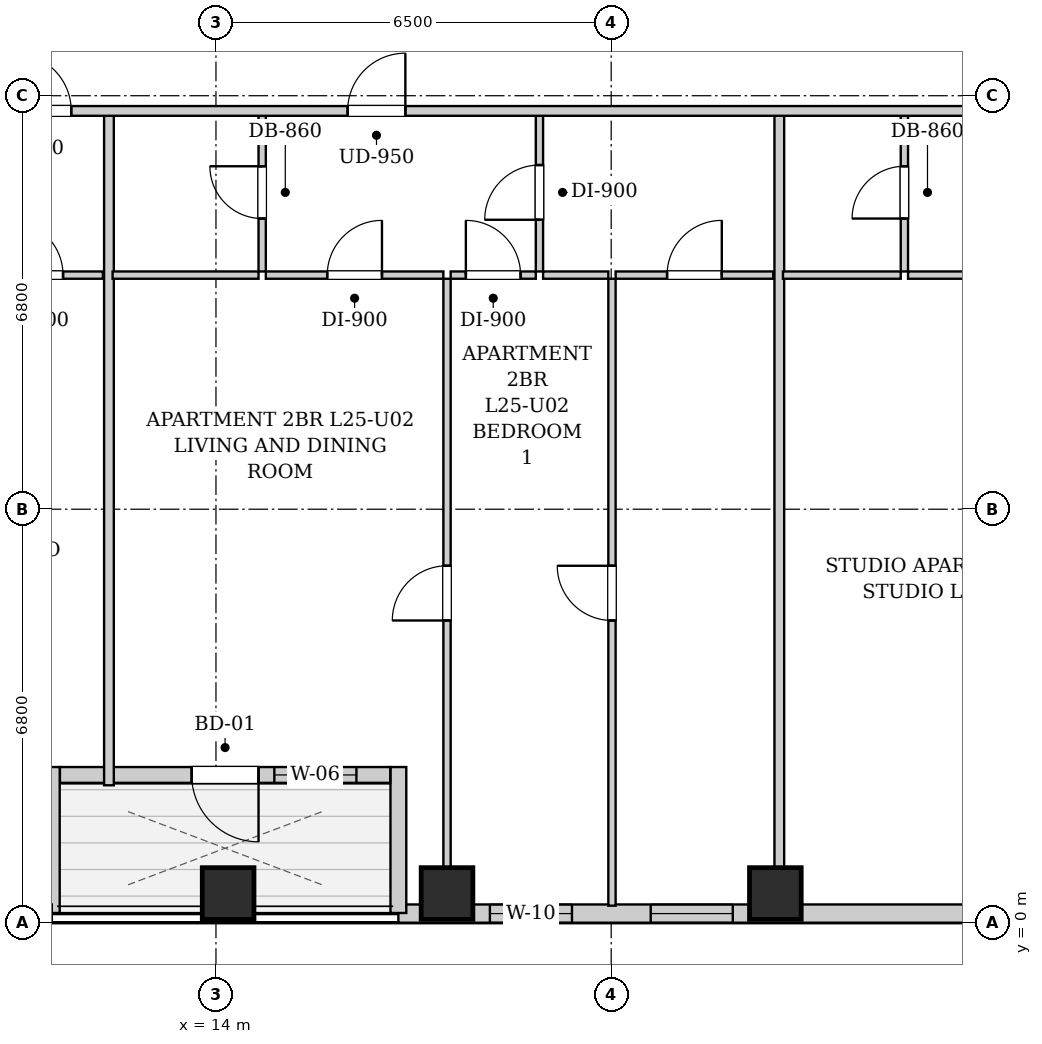
"""IFC4 building model, lengths in metres.
Left out: names, types, materials, properties, quantities, classifications, styles, units other than length and angle.
Written with IfcOpenShell. Run it as: python <this file> out.ifc"""

import sys

from ifc_helpers import new_model, si_unit, direction, frame, frame_2d, origin, origin_2d, place, context, subcontext, project, spatial, rectangle, extrude, element, fill, save


model = new_model("IFC4")
c1 = context("Model", 3, precision=1e-05, world=origin(), true_north=direction((0.0, 1.0)))
c2 = subcontext(c1, "Body", "Model", "MODEL_VIEW")
j1 = project(units=[si_unit("LENGTHUNIT", "METRE"), si_unit("PLANEANGLEUNIT", "RADIAN")], contexts=[c1])
p1 = place(None, origin())
s1 = spatial("IfcSite", under=j1, at=p1, CompositionType="ELEMENT")
p2 = place(p1, origin())
s2 = spatial("IfcBuilding", under=s1, at=p2, CompositionType="ELEMENT")
p3 = place(p2, frame((0.0, 0.0, 91.1)))
s3 = spatial("IfcBuildingStorey", under=s2, at=p3, CompositionType="ELEMENT", Elevation=91.1)
for number, where, z_axis, x_axis in (
    (1, (14.2, 0.48, 0.0), (0.0, 0.0, 1.0), (1.0, 0.0, 0.0)),
    (2, (17.8, 0.48, 0.0), (0.0, 0.0, 1.0), (1.0, 0.0, 0.0)),
    (3, (23.2, 0.48, 0.0), (0.0, 0.0, 1.0), (1.0, 0.0, 0.0)),
):
    element("IfcColumn", number, at=place(p3, frame(where, z_axis=z_axis, x_axis=x_axis)), inside=s3, PredefinedType="COLUMN", context=c2, shape_type="SweptSolid", body=[
        extrude(rectangle(XDim=0.85, YDim=0.85, at=origin_2d()), origin(), (0.0, 0.0, 1.0), 3.2),
    ])
p4 = place(p3, frame((40.9, 0.15, 0.0), z_axis=(0.0, 0.0, 1.0), x_axis=(-1.0, 0.0, 0.0)))
e4 = element("IfcWall", 4, at=p4, inside=s3, PredefinedType="SOLIDWALL", context=c2, shape_type="SweptSolid", body=[
    extrude(rectangle(XDim=23.9, YDim=0.3, at=frame_2d((11.95, 0.0))), origin(), (0.0, 0.0, 1.0), 2.94),
])
p5 = place(p4, frame((21.045, 0.0, 0.55)))
e5 = element("IfcOpeningElement", 5, at=p5, cuts=e4, PredefinedType="OPENING", context=c2, shape_type="SweptSolid", body=[
    extrude(rectangle(XDim=1.35, YDim=1.2, at=frame_2d((0.675, 0.6))), frame((0.0, 0.16, 0.0), z_axis=(0.0, -1.0, 0.0), x_axis=(1.0, 0.0, 0.0)), (0.0, 0.0, 1.0), 0.32),
])
p6 = place(p4, frame((18.4, 0.0, 0.55)))
e6 = element("IfcOpeningElement", 6, at=p6, cuts=e4, PredefinedType="OPENING", context=c2, shape_type="SweptSolid", body=[
    extrude(rectangle(XDim=1.35, YDim=1.2, at=frame_2d((0.675, 0.6))), frame((0.0, 0.16, 0.0), z_axis=(0.0, -1.0, 0.0), x_axis=(1.0, 0.0, 0.0)), (0.0, 0.0, 1.0), 0.32),
])
p7 = place(p4, frame((12.05, 0.0, 0.55)))
e7 = element("IfcOpeningElement", 7, at=p7, cuts=e4, PredefinedType="OPENING", context=c2, shape_type="SweptSolid", body=[
    extrude(rectangle(XDim=1.35, YDim=1.2, at=frame_2d((0.675, 0.6))), frame((0.0, 0.16, 0.0), z_axis=(0.0, -1.0, 0.0), x_axis=(1.0, 0.0, 0.0)), (0.0, 0.0, 1.0), 0.32),
])
p8 = place(p4, frame((8.72, 0.0, 0.55)))
e8 = element("IfcOpeningElement", 8, at=p8, cuts=e4, PredefinedType="OPENING", context=c2, shape_type="SweptSolid", body=[
    extrude(rectangle(XDim=1.35, YDim=1.2, at=frame_2d((0.675, 0.6))), frame((0.0, 0.16, 0.0), z_axis=(0.0, -1.0, 0.0), x_axis=(1.0, 0.0, 0.0)), (0.0, 0.0, 1.0), 0.32),
])
p9 = place(p4, frame((5.563, 0.0, 0.55)))
e9 = element("IfcOpeningElement", 9, at=p9, cuts=e4, PredefinedType="OPENING", context=c2, shape_type="SweptSolid", body=[
    extrude(rectangle(XDim=1.35, YDim=1.2, at=frame_2d((0.675, 0.6))), frame((0.0, 0.16, 0.0), z_axis=(0.0, -1.0, 0.0), x_axis=(1.0, 0.0, 0.0)), (0.0, 0.0, 1.0), 0.32),
])
p10 = place(p3, frame((17.0, 0.16, 0.0), z_axis=(0.0, 0.0, 1.0), x_axis=(0.0, 1.0, 0.0)))
e10 = element("IfcWall", 10, at=p10, inside=s3, PredefinedType="SOLIDWALL", context=c2, shape_type="SweptSolid", body=[
    extrude(rectangle(XDim=2.4, YDim=0.26, at=frame_2d((1.2, 0.0))), origin(), (0.0, 0.0, 1.0), 2.94),
])
p11 = place(p3, frame((16.866, 2.43, 0.0), z_axis=(0.0, 0.0, 1.0), x_axis=(-1.0, 0.0, 0.0)))
e11 = element("IfcWall", 11, at=p11, inside=s3, PredefinedType="SOLIDWALL", context=c2, shape_type="SweptSolid", body=[
    extrude(rectangle(XDim=5.432, YDim=0.26, at=frame_2d((2.716, 0.0))), origin(), (0.0, 0.0, 1.0), 2.94),
])
p12 = place(p11, frame((2.166, 0.0, 0.0)))
e12 = element("IfcOpeningElement", 12, at=p12, cuts=e11, PredefinedType="OPENING", context=c2, shape_type="SweptSolid", body=[
    extrude(rectangle(XDim=1.1, YDim=2.0, at=frame_2d((0.55, 1.0))), frame((0.0, 0.14, 0.0), z_axis=(0.0, -1.0, 0.0), x_axis=(1.0, 0.0, 0.0)), (0.0, 0.0, 1.0), 0.28),
])
p13 = place(p11, frame((0.556, 0.0, 0.85)))
e13 = element("IfcOpeningElement", 13, at=p13, cuts=e11, PredefinedType="OPENING", context=c2, shape_type="SweptSolid", body=[
    extrude(rectangle(XDim=1.35, YDim=1.65, at=frame_2d((0.675, 0.825))), frame((0.0, 0.14, 0.0), z_axis=(0.0, -1.0, 0.0), x_axis=(1.0, 0.0, 0.0)), (0.0, 0.0, 1.0), 0.28),
])
p14 = place(p3, frame((11.3, 2.56, 0.0), z_axis=(0.0, 0.0, 1.0), x_axis=(0.0, -1.0, 0.0)))
e14 = element("IfcWall", 14, at=p14, inside=s3, PredefinedType="SOLIDWALL", context=c2, shape_type="SweptSolid", body=[
    extrude(rectangle(XDim=2.4, YDim=0.26, at=frame_2d((1.2, 0.0))), origin(), (0.0, 0.0, 1.0), 2.94),
])
p15 = place(p3, frame((11.3, 0.15, 0.0), z_axis=(0.0, 0.0, 1.0), x_axis=(-1.0, 0.0, 0.0)))
e15 = element("IfcWall", 15, at=p15, inside=s3, PredefinedType="SOLIDWALL", context=c2, shape_type="SweptSolid", body=[
    extrude(rectangle(XDim=1.3, YDim=0.3, at=frame_2d((0.65, 0.0))), origin(), (0.0, 0.0, 1.0), 2.94),
])
p16 = place(p3, frame((9.93, 10.65, 0.0), z_axis=(0.0, 0.0, 1.0), x_axis=(1.0, 0.0, 0.0)))
e16 = element("IfcWall", 16, at=p16, inside=s3, PredefinedType="PARTITIONING", context=c2, shape_type="SweptSolid", body=[
    extrude(rectangle(XDim=2.21, YDim=0.12, at=frame_2d((1.105, 0.0))), origin(), (0.0, 0.0, 1.0), 2.94),
])
p17 = place(p16, frame((0.655, 0.0, 0.0)))
e17 = element("IfcOpeningElement", 17, at=p17, cuts=e16, PredefinedType="OPENING", context=c2, shape_type="SweptSolid", body=[
    extrude(rectangle(XDim=0.9, YDim=2.05, at=frame_2d((0.45, 1.025))), frame((0.0, 0.07, 0.0), z_axis=(0.0, -1.0, 0.0), x_axis=(1.0, 0.0, 0.0)), (0.0, 0.0, 1.0), 0.14),
])
p18 = place(p3, frame((12.24, 2.26, 0.0), z_axis=(0.0, 0.0, 1.0), x_axis=(0.0, 1.0, 0.0)))
e18 = element("IfcWall", 18, at=p18, inside=s3, PredefinedType="PARTITIONING", context=c2, shape_type="SweptSolid", body=[
    extrude(rectangle(XDim=11.05, YDim=0.16, at=frame_2d((5.525, 0.0))), origin(), (0.0, 0.0, 1.0), 2.94),
])
p19 = place(p3, frame((14.76, 10.71, 0.0), z_axis=(0.0, 0.0, 1.0), x_axis=(0.0, 1.0, 0.0)))
e19 = element("IfcWall", 19, at=p19, inside=s3, PredefinedType="PARTITIONING", context=c2, shape_type="SweptSolid", body=[
    extrude(rectangle(XDim=2.6, YDim=0.12, at=frame_2d((1.3, 0.0))), origin(), (0.0, 0.0, 1.0), 2.94),
])
p20 = place(p19, frame((0.87, 0.0, 0.0)))
e20 = element("IfcOpeningElement", 20, at=p20, cuts=e19, PredefinedType="OPENING", context=c2, shape_type="SweptSolid", body=[
    extrude(rectangle(XDim=0.86, YDim=2.05, at=frame_2d((0.43, 1.025))), frame((0.0, 0.07, 0.0), z_axis=(0.0, -1.0, 0.0), x_axis=(1.0, 0.0, 0.0)), (0.0, 0.0, 1.0), 0.14),
])
p21 = place(p3, frame((12.3, 10.65, 0.0), z_axis=(0.0, 0.0, 1.0), x_axis=(1.0, 0.0, 0.0)))
e21 = element("IfcWall", 21, at=p21, inside=s3, PredefinedType="PARTITIONING", context=c2, shape_type="SweptSolid", body=[
    extrude(rectangle(XDim=2.4, YDim=0.12, at=frame_2d((1.2, 0.0))), origin(), (0.0, 0.0, 1.0), 2.94),
])
p22 = place(p3, frame((19.32, 10.71, 0.0), z_axis=(0.0, 0.0, 1.0), x_axis=(0.0, 1.0, 0.0)))
e22 = element("IfcWall", 22, at=p22, inside=s3, PredefinedType="PARTITIONING", context=c2, shape_type="SweptSolid", body=[
    extrude(rectangle(XDim=2.6, YDim=0.12, at=frame_2d((1.3, 0.0))), origin(), (0.0, 0.0, 1.0), 2.94),
])
p23 = place(p22, frame((0.85, 0.0, 0.0)))
e23 = element("IfcOpeningElement", 23, at=p23, cuts=e22, PredefinedType="OPENING", context=c2, shape_type="SweptSolid", body=[
    extrude(rectangle(XDim=0.9, YDim=2.05, at=frame_2d((0.45, 1.025))), frame((0.0, 0.07, 0.0), z_axis=(0.0, -1.0, 0.0), x_axis=(1.0, 0.0, 0.0)), (0.0, 0.0, 1.0), 0.14),
])
p24 = place(p3, frame((14.82, 10.65, 0.0), z_axis=(0.0, 0.0, 1.0), x_axis=(1.0, 0.0, 0.0)))
e24 = element("IfcWall", 24, at=p24, inside=s3, PredefinedType="PARTITIONING", context=c2, shape_type="SweptSolid", body=[
    extrude(rectangle(XDim=2.92, YDim=0.12, at=frame_2d((1.46, 0.0))), origin(), (0.0, 0.0, 1.0), 2.94),
])
p25 = place(p24, frame((1.01, 0.0, 0.0)))
e25 = element("IfcOpeningElement", 25, at=p25, cuts=e24, PredefinedType="OPENING", context=c2, shape_type="SweptSolid", body=[
    extrude(rectangle(XDim=0.9, YDim=2.05, at=frame_2d((0.45, 1.025))), frame((0.0, 0.07, 0.0), z_axis=(0.0, -1.0, 0.0), x_axis=(1.0, 0.0, 0.0)), (0.0, 0.0, 1.0), 0.14),
])
p26 = place(p3, frame((17.86, 10.65, 0.0), z_axis=(0.0, 0.0, 1.0), x_axis=(1.0, 0.0, 0.0)))
e26 = element("IfcWall", 26, at=p26, inside=s3, PredefinedType="PARTITIONING", context=c2, shape_type="SweptSolid", body=[
    extrude(rectangle(XDim=1.4, YDim=0.12, at=frame_2d((0.7, 0.0))), origin(), (0.0, 0.0, 1.0), 2.94),
])
p27 = place(p26, frame((0.25, 0.0, 0.0)))
e27 = element("IfcOpeningElement", 27, at=p27, cuts=e26, PredefinedType="OPENING", context=c2, shape_type="SweptSolid", body=[
    extrude(rectangle(XDim=0.9, YDim=2.05, at=frame_2d((0.45, 1.025))), frame((0.0, 0.07, 0.0), z_axis=(0.0, -1.0, 0.0), x_axis=(1.0, 0.0, 0.0)), (0.0, 0.0, 1.0), 0.14),
])
p28 = place(p3, frame((19.38, 10.65, 0.0), z_axis=(0.0, 0.0, 1.0), x_axis=(1.0, 0.0, 0.0)))
e28 = element("IfcWall", 28, at=p28, inside=s3, PredefinedType="PARTITIONING", context=c2, shape_type="SweptSolid", body=[
    extrude(rectangle(XDim=1.073, YDim=0.12, at=frame_2d((0.537, 0.0))), origin(), (0.0, 0.0, 1.0), 2.94),
])
p29 = place(p3, frame((20.573, 10.65, 0.0), z_axis=(0.0, 0.0, 1.0), x_axis=(1.0, 0.0, 0.0)))
e29 = element("IfcWall", 29, at=p29, inside=s3, PredefinedType="PARTITIONING", context=c2, shape_type="SweptSolid", body=[
    extrude(rectangle(XDim=2.592, YDim=0.12, at=frame_2d((1.296, 0.0))), origin(), (0.0, 0.0, 1.0), 2.94),
])
p30 = place(p29, frame((0.846, 0.0, 0.0)))
e30 = element("IfcOpeningElement", 30, at=p30, cuts=e29, PredefinedType="OPENING", context=c2, shape_type="SweptSolid", body=[
    extrude(rectangle(XDim=0.9, YDim=2.05, at=frame_2d((0.45, 1.025))), frame((0.0, 0.07, 0.0), z_axis=(0.0, -1.0, 0.0), x_axis=(1.0, 0.0, 0.0)), (0.0, 0.0, 1.0), 0.14),
])
p31 = place(p3, frame((17.8, 0.28, 0.0), z_axis=(0.0, 0.0, 1.0), x_axis=(0.0, 1.0, 0.0)))
e31 = element("IfcWall", 31, at=p31, inside=s3, PredefinedType="PARTITIONING", context=c2, shape_type="SweptSolid", body=[
    extrude(rectangle(XDim=10.31, YDim=0.12, at=frame_2d((5.155, 0.0))), origin(), (0.0, 0.0, 1.0), 2.309),
])
p32 = place(p31, frame((4.69, 0.0, 0.0)))
e32 = element("IfcOpeningElement", 32, at=p32, cuts=e31, PredefinedType="OPENING", context=c2, shape_type="SweptSolid", body=[
    extrude(rectangle(XDim=0.9, YDim=2.05, at=frame_2d((0.45, 1.025))), frame((0.0, 0.07, 0.0), z_axis=(0.0, -1.0, 0.0), x_axis=(1.0, 0.0, 0.0)), (0.0, 0.0, 1.0), 0.14),
])
p33 = place(p3, frame((20.513, 0.28, 0.0), z_axis=(0.0, 0.0, 1.0), x_axis=(0.0, 1.0, 0.0)))
e33 = element("IfcWall", 33, at=p33, inside=s3, PredefinedType="PARTITIONING", context=c2, shape_type="SweptSolid", body=[
    extrude(rectangle(XDim=10.31, YDim=0.12, at=frame_2d((5.155, 0.0))), origin(), (0.0, 0.0, 1.0), 2.94),
])
p34 = place(p33, frame((4.69, 0.0, 0.0)))
e34 = element("IfcOpeningElement", 34, at=p34, cuts=e33, PredefinedType="OPENING", context=c2, shape_type="SweptSolid", body=[
    extrude(rectangle(XDim=0.9, YDim=2.05, at=frame_2d((0.45, 1.025))), frame((0.0, 0.07, 0.0), z_axis=(0.0, -1.0, 0.0), x_axis=(1.0, 0.0, 0.0)), (0.0, 0.0, 1.0), 0.14),
])
p35 = place(p3, frame((23.265, 0.28, 0.0), z_axis=(0.0, 0.0, 1.0), x_axis=(0.0, 1.0, 0.0)))
e35 = element("IfcWall", 35, at=p35, inside=s3, PredefinedType="PARTITIONING", context=c2, shape_type="SweptSolid", body=[
    extrude(rectangle(XDim=13.03, YDim=0.16, at=frame_2d((6.515, 0.0))), origin(), (0.0, 0.0, 1.0), 2.94),
])
p36 = place(p3, frame((25.322, 10.71, 0.0), z_axis=(0.0, 0.0, 1.0), x_axis=(0.0, 1.0, 0.0)))
e36 = element("IfcWall", 36, at=p36, inside=s3, PredefinedType="PARTITIONING", context=c2, shape_type="SweptSolid", body=[
    extrude(rectangle(XDim=2.6, YDim=0.12, at=frame_2d((1.3, 0.0))), origin(), (0.0, 0.0, 1.0), 2.94),
])
p37 = place(p36, frame((0.87, 0.0, 0.0)))
e37 = element("IfcOpeningElement", 37, at=p37, cuts=e36, PredefinedType="OPENING", context=c2, shape_type="SweptSolid", body=[
    extrude(rectangle(XDim=0.86, YDim=2.05, at=frame_2d((0.43, 1.025))), frame((0.0, 0.07, 0.0), z_axis=(0.0, -1.0, 0.0), x_axis=(1.0, 0.0, 0.0)), (0.0, 0.0, 1.0), 0.14),
])
p38 = place(p3, frame((23.325, 10.65, 0.0), z_axis=(0.0, 0.0, 1.0), x_axis=(1.0, 0.0, 0.0)))
e38 = element("IfcWall", 38, at=p38, inside=s3, PredefinedType="PARTITIONING", context=c2, shape_type="SweptSolid", body=[
    extrude(rectangle(XDim=1.937, YDim=0.12, at=frame_2d((0.969, 0.0))), origin(), (0.0, 0.0, 1.0), 2.94),
])
p39 = place(p3, frame((25.382, 10.65, 0.0), z_axis=(0.0, 0.0, 1.0), x_axis=(1.0, 0.0, 0.0)))
e39 = element("IfcWall", 39, at=p39, inside=s3, PredefinedType="PARTITIONING", context=c2, shape_type="SweptSolid", body=[
    extrude(rectangle(XDim=4.398, YDim=0.12, at=frame_2d((2.199, 0.0))), origin(), (0.0, 0.0, 1.0), 2.94),
])
p40 = place(p39, frame((1.749, 0.0, 0.0)))
e40 = element("IfcOpeningElement", 40, at=p40, cuts=e39, PredefinedType="OPENING", context=c2, shape_type="SweptSolid", body=[
    extrude(rectangle(XDim=0.9, YDim=2.05, at=frame_2d((0.45, 1.025))), frame((0.0, 0.07, 0.0), z_axis=(0.0, -1.0, 0.0), x_axis=(1.0, 0.0, 0.0)), (0.0, 0.0, 1.0), 0.14),
])
p41 = place(p3, frame((10.05, 13.35, 0.0), z_axis=(0.0, 0.0, 1.0), x_axis=(1.0, 0.0, 0.0)))
e41 = element("IfcWall", 41, at=p41, inside=s3, PredefinedType="PARTITIONING", context=c2, shape_type="SweptSolid", body=[
    extrude(rectangle(XDim=30.8, YDim=0.16, at=frame_2d((15.4, 0.0))), origin(), (0.0, 0.0, 1.0), 2.94),
])
p42 = place(p41, frame((0.62, 0.0, 0.0)))
e42 = element("IfcOpeningElement", 42, at=p42, cuts=e41, PredefinedType="OPENING", context=c2, shape_type="SweptSolid", body=[
    extrude(rectangle(XDim=0.95, YDim=2.1, at=frame_2d((0.475, 1.05))), frame((0.0, 0.09, 0.0), z_axis=(0.0, -1.0, 0.0), x_axis=(1.0, 0.0, 0.0)), (0.0, 0.0, 1.0), 0.18),
])
p43 = place(p41, frame((6.115, 0.0, 0.0)))
e43 = element("IfcOpeningElement", 43, at=p43, cuts=e41, PredefinedType="OPENING", context=c2, shape_type="SweptSolid", body=[
    extrude(rectangle(XDim=0.95, YDim=2.1, at=frame_2d((0.475, 1.05))), frame((0.0, 0.09, 0.0), z_axis=(0.0, -1.0, 0.0), x_axis=(1.0, 0.0, 0.0)), (0.0, 0.0, 1.0), 0.18),
])
p44 = place(p41, frame((17.056, 0.0, 0.0)))
e44 = element("IfcOpeningElement", 44, at=p44, cuts=e41, PredefinedType="OPENING", context=c2, shape_type="SweptSolid", body=[
    extrude(rectangle(XDim=0.95, YDim=2.1, at=frame_2d((0.475, 1.05))), frame((0.0, 0.09, 0.0), z_axis=(0.0, -1.0, 0.0), x_axis=(1.0, 0.0, 0.0)), (0.0, 0.0, 1.0), 0.18),
])
p45 = place(p41, frame((24.025, 0.0, 0.0)))
e45 = element("IfcOpeningElement", 45, at=p45, cuts=e41, PredefinedType="OPENING", context=c2, shape_type="SweptSolid", body=[
    extrude(rectangle(XDim=0.95, YDim=2.1, at=frame_2d((0.475, 1.05))), frame((0.0, 0.09, 0.0), z_axis=(0.0, -1.0, 0.0), x_axis=(1.0, 0.0, 0.0)), (0.0, 0.0, 1.0), 0.18),
])
p46 = place(p17, origin())
e46 = element("IfcDoor", 46, at=p46, inside=s3, OperationType="SINGLE_SWING_LEFT", PredefinedType="DOOR", context=c2, shape_type="SweptSolid", body=[
    extrude(rectangle(XDim=0.9, YDim=2.05, at=frame_2d((0.45, 1.025))), frame((0.0, 0.025, 0.0), z_axis=(0.0, -1.0, 0.0), x_axis=(1.0, 0.0, 0.0)), (0.0, 0.0, 1.0), 0.05),
])
fill(e17, e46)
p47 = place(p20, origin())
e47 = element("IfcDoor", 47, at=p47, inside=s3, OperationType="SINGLE_SWING_RIGHT", PredefinedType="DOOR", context=c2, shape_type="SweptSolid", body=[
    extrude(rectangle(XDim=0.86, YDim=2.05, at=frame_2d((0.43, 1.025))), frame((0.0, 0.025, 0.0), z_axis=(0.0, -1.0, 0.0), x_axis=(1.0, 0.0, 0.0)), (0.0, 0.0, 1.0), 0.05),
])
fill(e20, e47)
p48 = place(p23, origin())
e48 = element("IfcDoor", 48, at=p48, inside=s3, OperationType="SINGLE_SWING_LEFT", PredefinedType="DOOR", context=c2, shape_type="SweptSolid", body=[
    extrude(rectangle(XDim=0.9, YDim=2.05, at=frame_2d((0.45, 1.025))), frame((0.0, 0.025, 0.0), z_axis=(0.0, -1.0, 0.0), x_axis=(1.0, 0.0, 0.0)), (0.0, 0.0, 1.0), 0.05),
])
fill(e23, e48)
p49 = place(p25, origin())
e49 = element("IfcDoor", 49, at=p49, inside=s3, OperationType="SINGLE_SWING_RIGHT", PredefinedType="DOOR", context=c2, shape_type="SweptSolid", body=[
    extrude(rectangle(XDim=0.9, YDim=2.05, at=frame_2d((0.45, 1.025))), frame((0.0, 0.025, 0.0), z_axis=(0.0, -1.0, 0.0), x_axis=(1.0, 0.0, 0.0)), (0.0, 0.0, 1.0), 0.05),
])
fill(e25, e49)
p50 = place(p27, origin())
e50 = element("IfcDoor", 50, at=p50, inside=s3, OperationType="SINGLE_SWING_LEFT", PredefinedType="DOOR", context=c2, shape_type="SweptSolid", body=[
    extrude(rectangle(XDim=0.9, YDim=2.05, at=frame_2d((0.45, 1.025))), frame((0.0, 0.025, 0.0), z_axis=(0.0, -1.0, 0.0), x_axis=(1.0, 0.0, 0.0)), (0.0, 0.0, 1.0), 0.05),
])
fill(e27, e50)
p51 = place(p30, origin())
e51 = element("IfcDoor", 51, at=p51, inside=s3, OperationType="SINGLE_SWING_RIGHT", PredefinedType="DOOR", context=c2, shape_type="SweptSolid", body=[
    extrude(rectangle(XDim=0.9, YDim=2.05, at=frame_2d((0.45, 1.025))), frame((0.0, 0.025, 0.0), z_axis=(0.0, -1.0, 0.0), x_axis=(1.0, 0.0, 0.0)), (0.0, 0.0, 1.0), 0.05),
])
fill(e30, e51)
p52 = place(p32, origin())
e52 = element("IfcDoor", 52, at=p52, inside=s3, OperationType="SINGLE_SWING_LEFT", PredefinedType="DOOR", context=c2, shape_type="SweptSolid", body=[
    extrude(rectangle(XDim=0.9, YDim=2.05, at=frame_2d((0.45, 1.025))), frame((0.0, 0.025, 0.0), z_axis=(0.0, -1.0, 0.0), x_axis=(1.0, 0.0, 0.0)), (0.0, 0.0, 1.0), 0.05),
])
fill(e32, e52)
p53 = place(p34, origin())
e53 = element("IfcDoor", 53, at=p53, inside=s3, OperationType="SINGLE_SWING_RIGHT", PredefinedType="DOOR", context=c2, shape_type="SweptSolid", body=[
    extrude(rectangle(XDim=0.9, YDim=2.05, at=frame_2d((0.45, 1.025))), frame((0.0, 0.025, 0.0), z_axis=(0.0, -1.0, 0.0), x_axis=(1.0, 0.0, 0.0)), (0.0, 0.0, 1.0), 0.05),
])
fill(e34, e53)
p54 = place(p37, origin())
e54 = element("IfcDoor", 54, at=p54, inside=s3, OperationType="SINGLE_SWING_LEFT", PredefinedType="DOOR", context=c2, shape_type="SweptSolid", body=[
    extrude(rectangle(XDim=0.86, YDim=2.05, at=frame_2d((0.43, 1.025))), frame((0.0, 0.025, 0.0), z_axis=(0.0, -1.0, 0.0), x_axis=(1.0, 0.0, 0.0)), (0.0, 0.0, 1.0), 0.05),
])
fill(e37, e54)
p55 = place(p42, origin())
e55 = element("IfcDoor", 55, at=p55, inside=s3, OperationType="SINGLE_SWING_LEFT", PredefinedType="DOOR", context=c2, shape_type="SweptSolid", body=[
    extrude(rectangle(XDim=0.95, YDim=2.1, at=frame_2d((0.475, 1.05))), frame((0.0, 0.025, 0.0), z_axis=(0.0, -1.0, 0.0), x_axis=(1.0, 0.0, 0.0)), (0.0, 0.0, 1.0), 0.05),
])
fill(e42, e55)
p56 = place(p43, origin())
e56 = element("IfcDoor", 56, at=p56, inside=s3, OperationType="SINGLE_SWING_RIGHT", PredefinedType="DOOR", context=c2, shape_type="SweptSolid", body=[
    extrude(rectangle(XDim=0.95, YDim=2.1, at=frame_2d((0.475, 1.05))), frame((0.0, 0.025, 0.0), z_axis=(0.0, -1.0, 0.0), x_axis=(1.0, 0.0, 0.0)), (0.0, 0.0, 1.0), 0.05),
])
fill(e43, e56)
p57 = place(p12, origin())
e57 = element("IfcDoor", 57, at=p57, inside=s3, OperationType="SINGLE_SWING_LEFT", PredefinedType="DOOR", context=c2, shape_type="SweptSolid", body=[
    extrude(rectangle(XDim=1.1, YDim=2.0, at=frame_2d((0.55, 1.0))), frame((0.0, 0.025, 0.0), z_axis=(0.0, -1.0, 0.0), x_axis=(1.0, 0.0, 0.0)), (0.0, 0.0, 1.0), 0.05),
])
fill(e12, e57)
p58 = place(p13, origin())
e58 = element("IfcWindow", 58, at=p58, inside=s3, PartitioningType="SINGLE_PANEL", PredefinedType="WINDOW", context=c2, shape_type="SweptSolid", body=[
    extrude(rectangle(XDim=1.35, YDim=1.65, at=frame_2d((0.675, 0.825))), frame((0.0, 0.03, 0.0), z_axis=(0.0, -1.0, 0.0), x_axis=(1.0, 0.0, 0.0)), (0.0, 0.0, 1.0), 0.06),
])
fill(e13, e58)
p59 = place(p5, origin())
e59 = element("IfcWindow", 59, at=p59, inside=s3, PartitioningType="SINGLE_PANEL", PredefinedType="WINDOW", context=c2, shape_type="SweptSolid", body=[
    extrude(rectangle(XDim=1.35, YDim=1.2, at=frame_2d((0.675, 0.6))), frame((0.0, 0.03, 0.0), z_axis=(0.0, -1.0, 0.0), x_axis=(1.0, 0.0, 0.0)), (0.0, 0.0, 1.0), 0.06),
])
fill(e5, e59)
p60 = place(p6, origin())
e60 = element("IfcWindow", 60, at=p60, inside=s3, PartitioningType="SINGLE_PANEL", PredefinedType="WINDOW", context=c2, shape_type="SweptSolid", body=[
    extrude(rectangle(XDim=1.35, YDim=1.2, at=frame_2d((0.675, 0.6))), frame((0.0, 0.03, 0.0), z_axis=(0.0, -1.0, 0.0), x_axis=(1.0, 0.0, 0.0)), (0.0, 0.0, 1.0), 0.06),
])
fill(e6, e60)
save(model, sys.argv[1])
